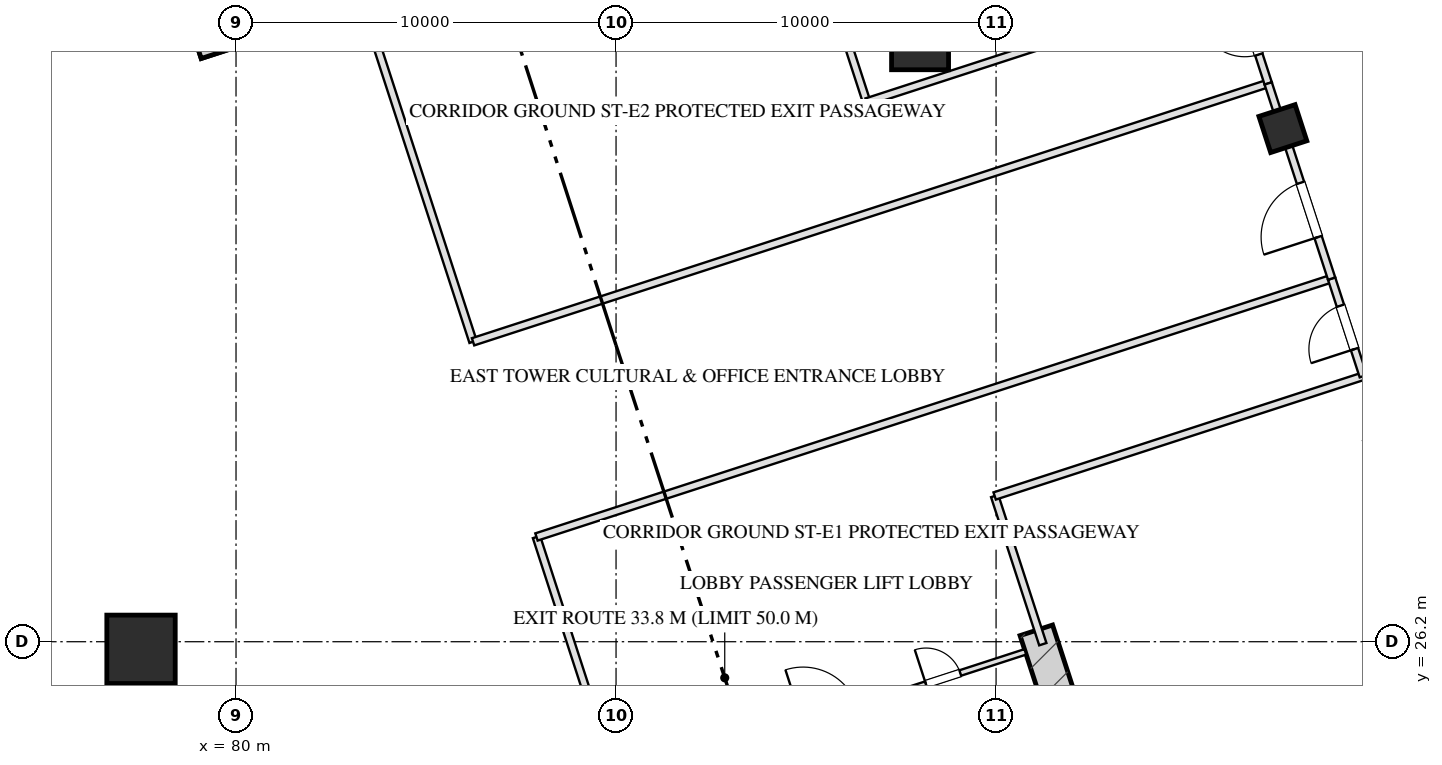
"""IFC4 building model, lengths in metres.
Left out: names, types, materials, properties, quantities, classifications, styles, units other than length and angle.
Written with IfcOpenShell. Run it as: python <this file> out.ifc"""

import sys

from ifc_helpers import new_model, si_unit, direction, frame, frame_2d, origin, origin_2d, place, context, subcontext, project, spatial, rectangle, hollow_rectangle, extrude, element, fill, save


model = new_model("IFC4")
c1 = context("Model", 3, precision=1e-05, world=origin(), true_north=direction((0.0, 1.0)))
c2 = subcontext(c1, "Body", "Model", "MODEL_VIEW")
j1 = project(units=[si_unit("LENGTHUNIT", "METRE"), si_unit("PLANEANGLEUNIT", "RADIAN")], contexts=[c1])
p1 = place(None, origin())
s1 = spatial("IfcSite", under=j1, at=p1, CompositionType="ELEMENT")
p2 = place(p1, origin())
s2 = spatial("IfcBuilding", under=s1, at=p2, CompositionType="ELEMENT")
p3 = place(p2, origin())
s3 = spatial("IfcBuildingStorey", under=s2, at=p3, CompositionType="ELEMENT", Elevation=0.0)
for number, where, z_axis, x_axis in (
    (1, (101.059, 26.5, 0.0), (0.0, 0.0, 1.0), (0.309, -0.951, 0.0)),
    (2, (79.512, 41.685, 0.0), (0.0, 0.0, 1.0), (-0.309, 0.951, 0.0)),
):
    element("IfcWall", number, at=place(p3, frame(where, z_axis=z_axis, x_axis=x_axis)), inside=s3, PredefinedType="SHEAR", context=c2, shape_type="SweptSolid", body=[
        extrude(rectangle(XDim=9.78, YDim=0.9, at=frame_2d((4.89, 0.0))), origin(), (0.0, 0.0, 1.0), 6.0),
    ])
p4 = place(p3, frame((78.945, 41.974, 0.0), z_axis=(0.0, 0.0, 1.0), x_axis=(0.951058289404, 0.309011537255, 0.0)))
e3 = element("IfcWall", 3, at=p4, inside=s3, PredefinedType="SHEAR", context=c2, shape_type="SweptSolid", body=[
    extrude(rectangle(XDim=4.37, YDim=0.9, at=frame_2d((2.185, 0.0))), origin(), (0.0, 0.0, 1.0), 6.0),
])
p5 = place(p3, frame((77.5, 26.0, 0.0), z_axis=(0.0, 0.0, 1.0), x_axis=(1.0, 0.0, 0.0)))
e4 = element("IfcColumn", 4, at=p5, inside=s3, PredefinedType="COLUMN", context=c2, shape_type="SweptSolid", body=[
    extrude(hollow_rectangle(XDim=1.8, YDim=1.8, WallThickness=0.06, at=origin_2d()), origin(), (0.0, 0.0, 1.0), 6.001),
])
p6 = place(p3, frame((98.0, 42.0, 0.0), z_axis=(0.0, 0.0, 1.0), x_axis=(1.0, 0.0, 0.0)))
e5 = element("IfcColumn", 5, at=p6, inside=s3, PredefinedType="COLUMN", context=c2, shape_type="SweptSolid", body=[
    extrude(rectangle(XDim=1.5, YDim=1.5, at=origin_2d()), origin(), (0.0, 0.0, 1.0), 6.001),
])
p7 = place(p3, frame((107.547, 39.701, 0.0), z_axis=(0.0, 0.0, 1.0), x_axis=(0.951056516295, 0.309016994375, 0.0)))
e6 = element("IfcColumn", 6, at=p7, inside=s3, PredefinedType="COLUMN", context=c2, shape_type="SweptSolid", body=[
    extrude(hollow_rectangle(XDim=1.0, YDim=1.0, WallThickness=0.036, at=origin_2d()), origin(), (0.0, 0.0, 1.0), 6.001),
])
p8 = place(p3, frame((97.727, 24.944, 0.0), z_axis=(0.0, 0.0, 1.0), x_axis=(0.951036872128, 0.309077446369, 0.0)))
e7 = element("IfcWall", 7, at=p8, inside=s3, PredefinedType="PARTITIONING", context=c2, shape_type="SweptSolid", body=[
    extrude(rectangle(XDim=3.2, YDim=0.15, at=frame_2d((1.6, 0.0))), origin(), (0.0, 0.0, 1.0), 5.685),
])
p9 = place(p8, frame((0.45, 0.0, 0.0)))
e8 = element("IfcOpeningElement", 8, at=p9, cuts=e7, PredefinedType="OPENING", context=c2, shape_type="SweptSolid", body=[
    extrude(rectangle(XDim=0.95, YDim=2.05, at=frame_2d((0.475, 1.025))), frame((0.0, 0.085, 0.0), z_axis=(0.0, -1.0, 0.0), x_axis=(1.0, 0.0, 0.0)), (0.0, 0.0, 1.0), 0.17),
])
p10 = place(p3, frame((90.008, 22.489, 0.0), z_axis=(0.0, 0.0, 1.0), x_axis=(-0.309023559774, 0.951054383043, 0.0)))
e9 = element("IfcWall", 9, at=p10, inside=s3, PredefinedType="PARTITIONING", context=c2, shape_type="SweptSolid", body=[
    extrude(rectangle(XDim=6.8, YDim=0.2, at=frame_2d((3.4, 0.0))), origin(), (0.0, 0.0, 1.0), 5.685),
])
p11 = place(p3, frame((87.906, 28.956, 0.0), z_axis=(0.0, 0.0, 1.0), x_axis=(0.951056330024, 0.309017567658, 0.0)))
e10 = element("IfcWall", 10, at=p11, inside=s3, PredefinedType="PARTITIONING", context=c2, shape_type="SweptSolid", body=[
    extrude(rectangle(XDim=22.0, YDim=0.2, at=frame_2d((11.0, 0.0))), origin(), (0.0, 0.0, 1.0), 5.685),
])
p12 = place(p3, frame((101.23, 26.135, 0.0), z_axis=(0.0, 0.0, 1.0), x_axis=(-0.30903760131, 0.951049820449, 0.0)))
e11 = element("IfcWall", 11, at=p12, inside=s3, PredefinedType="PARTITIONING", context=c2, shape_type="SweptSolid", body=[
    extrude(rectangle(XDim=4.1, YDim=0.2, at=frame_2d((2.05, 0.0))), origin(), (0.0, 0.0, 1.0), 5.685),
])
p13 = place(p3, frame((99.963, 30.035, 0.0), z_axis=(0.0, 0.0, 1.0), x_axis=(0.951061328589, 0.309002183266, 0.0)))
e12 = element("IfcWall", 12, at=p13, inside=s3, PredefinedType="PARTITIONING", context=c2, shape_type="SweptSolid", body=[
    extrude(rectangle(XDim=10.2, YDim=0.2, at=frame_2d((5.1, 0.0))), origin(), (0.0, 0.0, 1.0), 5.685),
])
p14 = place(p3, frame((109.664, 33.187, 0.0), z_axis=(0.0, 0.0, 1.0), x_axis=(-0.309057448393, 0.951043371037, 0.0)))
e13 = element("IfcWall", 13, at=p14, inside=s3, PredefinedType="PARTITIONING", context=c2, shape_type="SweptSolid", body=[
    extrude(rectangle(XDim=2.7, YDim=0.2, at=frame_2d((1.35, 0.0))), origin(), (0.0, 0.0, 1.0), 5.685),
])
p15 = place(p14, frame((0.75, 0.0, 0.0)))
e14 = element("IfcOpeningElement", 14, at=p15, cuts=e13, PredefinedType="OPENING", context=c2, shape_type="SweptSolid", body=[
    extrude(rectangle(XDim=1.2, YDim=2.05, at=frame_2d((0.6, 1.025))), frame((0.0, 0.11, 0.0), z_axis=(0.0, -1.0, 0.0), x_axis=(1.0, 0.0, 0.0)), (0.0, 0.0, 1.0), 0.22),
])
p16 = place(p3, frame((86.238, 34.092, 0.0), z_axis=(0.0, 0.0, 1.0), x_axis=(-0.309022900594, 0.951054597228, 0.0)))
e15 = element("IfcWall", 15, at=p16, inside=s3, PredefinedType="PARTITIONING", context=c2, shape_type="SweptSolid", body=[
    extrude(rectangle(XDim=9.7, YDim=0.2, at=frame_2d((4.85, 0.0))), origin(), (0.0, 0.0, 1.0), 5.685),
])
p17 = place(p3, frame((86.238, 34.092, 0.0), z_axis=(0.0, 0.0, 1.0), x_axis=(0.951056330024, 0.309017567658, 0.0)))
e16 = element("IfcWall", 16, at=p17, inside=s3, PredefinedType="PARTITIONING", context=c2, shape_type="SweptSolid", body=[
    extrude(rectangle(XDim=22.0, YDim=0.2, at=frame_2d((11.0, 0.0))), origin(), (0.0, 0.0, 1.0), 5.685),
])
p18 = place(p3, frame((94.462, 46.963, 0.0), z_axis=(0.0, 0.0, 1.0), x_axis=(0.309032467762, -0.951051488548, 0.0)))
e17 = element("IfcWall", 17, at=p18, inside=s3, PredefinedType="PARTITIONING", context=c2, shape_type="SweptSolid", body=[
    extrude(rectangle(XDim=6.9, YDim=0.2, at=frame_2d((3.45, 0.0))), origin(), (0.0, 0.0, 1.0), 5.685),
])
p19 = place(p3, frame((96.595, 40.401, 0.0), z_axis=(0.0, 0.0, 1.0), x_axis=(0.951052008584, 0.309030867339, 0.0)))
e18 = element("IfcWall", 18, at=p19, inside=s3, PredefinedType="PARTITIONING", context=c2, shape_type="SweptSolid", body=[
    extrude(rectangle(XDim=10.2, YDim=0.2, at=frame_2d((5.1, 0.0))), origin(), (0.0, 0.0, 1.0), 4.675),
])
p20 = place(p3, frame((107.161, 40.89, 0.0), z_axis=(0.0, 0.0, 1.0), x_axis=(-0.308999325213, 0.951062257173, 0.0)))
e19 = element("IfcWall", 19, at=p20, inside=s3, PredefinedType="PARTITIONING", context=c2, shape_type="SweptSolid", body=[
    extrude(rectangle(XDim=2.8, YDim=0.2, at=frame_2d((1.4, 0.0))), origin(), (0.0, 0.0, 1.0), 5.685),
])
p21 = place(p20, frame((0.8, 0.0, 0.0)))
e20 = element("IfcOpeningElement", 20, at=p21, cuts=e19, PredefinedType="OPENING", context=c2, shape_type="SweptSolid", body=[
    extrude(rectangle(XDim=1.2, YDim=2.05, at=frame_2d((0.6, 1.025))), frame((0.0, 0.11, 0.0), z_axis=(0.0, -1.0, 0.0), x_axis=(1.0, 0.0, 0.0)), (0.0, 0.0, 1.0), 0.22),
])
p22 = place(p3, frame((108.829, 35.754, 0.0), z_axis=(0.0, 0.0, 1.0), x_axis=(-0.309016555588, 0.951056658866, 0.0)))
e21 = element("IfcWall", 21, at=p22, inside=s3, PredefinedType="PARTITIONING", context=c2, shape_type="SweptSolid", body=[
    extrude(rectangle(XDim=5.4, YDim=0.2, at=frame_2d((2.7, 0.0))), origin(), (0.0, 0.0, 1.0), 5.685),
])
p23 = place(p22, frame((1.15, 0.0, 0.0)))
e22 = element("IfcOpeningElement", 22, at=p23, cuts=e21, PredefinedType="OPENING", context=c2, shape_type="SweptSolid", body=[
    extrude(rectangle(XDim=1.5, YDim=2.05, at=frame_2d((0.75, 1.025))), frame((0.0, 0.11, 0.0), z_axis=(0.0, -1.0, 0.0), x_axis=(1.0, 0.0, 0.0)), (0.0, 0.0, 1.0), 0.22),
])
p24 = place(p9, origin())
e23 = element("IfcDoor", 23, at=p24, inside=s3, OperationType="SINGLE_SWING_LEFT", PredefinedType="DOOR", context=c2, shape_type="SweptSolid", body=[
    extrude(rectangle(XDim=0.95, YDim=2.05, at=frame_2d((0.475, 1.025))), frame((0.0, 0.025, 0.0), z_axis=(0.0, -1.0, 0.0), x_axis=(1.0, 0.0, 0.0)), (0.0, 0.0, 1.0), 0.05),
])
fill(e8, e23)
p25 = place(p15, origin())
e24 = element("IfcDoor", 24, at=p25, inside=s3, OperationType="SINGLE_SWING_LEFT", PredefinedType="DOOR", context=c2, shape_type="SweptSolid", body=[
    extrude(rectangle(XDim=1.2, YDim=2.05, at=frame_2d((0.6, 1.025))), frame((0.0, 0.025, 0.0), z_axis=(0.0, -1.0, 0.0), x_axis=(1.0, 0.0, 0.0)), (0.0, 0.0, 1.0), 0.05),
])
fill(e14, e24)
p26 = place(p21, origin())
e25 = element("IfcDoor", 25, at=p26, inside=s3, OperationType="SINGLE_SWING_RIGHT", PredefinedType="DOOR", context=c2, shape_type="SweptSolid", body=[
    extrude(rectangle(XDim=1.2, YDim=2.05, at=frame_2d((0.6, 1.025))), frame((0.0, 0.025, 0.0), z_axis=(0.0, -1.0, 0.0), x_axis=(1.0, 0.0, 0.0)), (0.0, 0.0, 1.0), 0.05),
])
fill(e20, e25)
p27 = place(p23, origin())
e26 = element("IfcDoor", 26, at=p27, inside=s3, OperationType="SINGLE_SWING_LEFT", PredefinedType="DOOR", context=c2, shape_type="SweptSolid", body=[
    extrude(rectangle(XDim=1.5, YDim=2.05, at=frame_2d((0.75, 1.025))), frame((0.0, 0.025, 0.0), z_axis=(0.0, -1.0, 0.0), x_axis=(1.0, 0.0, 0.0)), (0.0, 0.0, 1.0), 0.05),
])
fill(e22, e26)
save(model, sys.argv[1])
